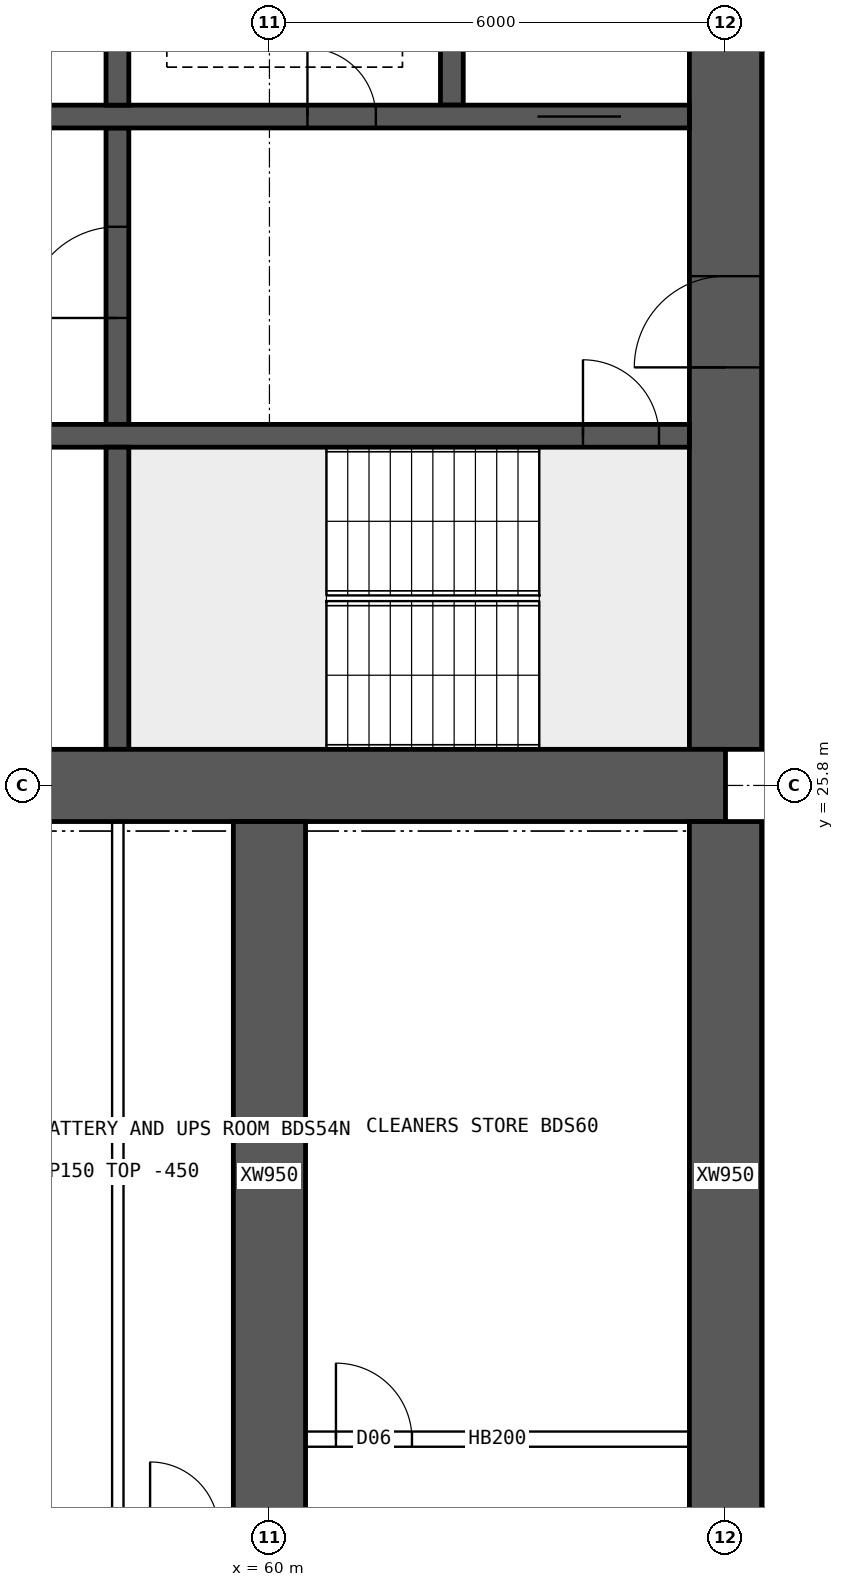
"""IFC4 building model, lengths in metres.
Left out: names, types, materials, properties, quantities, classifications, styles, units other than length and angle.
Written with IfcOpenShell. Run it as: python <this file> out.ifc"""

import sys

from ifc_helpers import new_model, si_unit, direction, frame, frame_2d, origin, place, context, subcontext, project, spatial, rectangle, extrude, element, fill, save


model = new_model("IFC4")
c1 = context("Model", 3, precision=1e-05, world=origin(), true_north=direction((0.0, 1.0)))
c2 = subcontext(c1, "Body", "Model", "MODEL_VIEW")
j1 = project(units=[si_unit("LENGTHUNIT", "METRE"), si_unit("PLANEANGLEUNIT", "RADIAN")], contexts=[c1])
p1 = place(None, origin())
s1 = spatial("IfcSite", under=j1, at=p1, CompositionType="ELEMENT")
p2 = place(p1, origin())
s2 = spatial("IfcBuilding", under=s1, at=p2, CompositionType="ELEMENT")
p3 = place(p2, frame((0.0, 0.0, 110.65)))
s3 = spatial("IfcBuildingStorey", under=s2, at=p3, CompositionType="ELEMENT", Elevation=110.65)
p4 = place(p3, frame((18.0, 25.8, 0.0), z_axis=(0.0, 0.0, 1.0), x_axis=(1.0, 0.0, 0.0)))
e1 = element("IfcWall", 1, at=p4, inside=s3, PredefinedType="SHEAR", context=c2, shape_type="SweptSolid", body=[
    extrude(rectangle(XDim=48.0, YDim=0.95, at=frame_2d((24.0, 0.0))), origin(), (0.0, 0.0, 1.0), 3.75),
])
p5 = place(p3, frame((66.0, 26.275, 0.0), z_axis=(0.0, 0.0, 1.0), x_axis=(0.0, 1.0, 0.0)))
e2 = element("IfcWall", 2, at=p5, inside=s3, PredefinedType="SHEAR", context=c2, shape_type="SweptSolid", body=[
    extrude(rectangle(XDim=11.45, YDim=0.95, at=frame_2d((5.725, 0.0))), origin(), (0.0, 0.0, 1.0), 3.75),
])
p6 = place(p5, frame((5.025, 0.0, 0.0)))
e3 = element("IfcOpeningElement", 3, at=p6, cuts=e2, PredefinedType="OPENING", context=c2, shape_type="SweptSolid", body=[
    extrude(rectangle(XDim=1.2, YDim=2.1, at=frame_2d((0.6, 1.05))), frame((0.0, 0.485, 0.0), z_axis=(0.0, -1.0, 0.0), x_axis=(1.0, 0.0, 0.0)), (0.0, 0.0, 1.0), 0.97),
])
p7 = place(p3, frame((18.475, 30.4, 0.0), z_axis=(0.0, 0.0, 1.0), x_axis=(1.0, 0.0, 0.0)))
e4 = element("IfcWall", 4, at=p7, inside=s3, PredefinedType="SHEAR", context=c2, shape_type="SweptSolid", body=[
    extrude(rectangle(XDim=47.05, YDim=0.3, at=frame_2d((23.525, 0.0))), origin(), (0.0, 0.0, 1.0), 3.75),
])
p8 = place(p7, frame((0.4, 0.0, 0.0)))
e5 = element("IfcOpeningElement", 5, at=p8, cuts=e4, PredefinedType="OPENING", context=c2, shape_type="SweptSolid", body=[
    extrude(rectangle(XDim=1.0, YDim=2.1, at=frame_2d((0.5, 1.05))), frame((0.0, 0.16, 0.0), z_axis=(0.0, -1.0, 0.0), x_axis=(1.0, 0.0, 0.0)), (0.0, 0.0, 1.0), 0.32),
])
p9 = place(p7, frame((45.65, 0.0, 0.0)))
e6 = element("IfcOpeningElement", 6, at=p9, cuts=e4, PredefinedType="OPENING", context=c2, shape_type="SweptSolid", body=[
    extrude(rectangle(XDim=1.0, YDim=2.1, at=frame_2d((0.5, 1.05))), frame((0.0, 0.16, 0.0), z_axis=(0.0, -1.0, 0.0), x_axis=(1.0, 0.0, 0.0)), (0.0, 0.0, 1.0), 0.32),
])
p10 = place(p7, frame((8.275, 0.0, 0.0)))
e7 = element("IfcOpeningElement", 7, at=p10, cuts=e4, PredefinedType="OPENING", context=c2, shape_type="SweptSolid", body=[
    extrude(rectangle(XDim=1.1, YDim=2.1, at=frame_2d((0.55, 1.05))), frame((0.0, 0.16, 0.0), z_axis=(0.0, -1.0, 0.0), x_axis=(1.0, 0.0, 0.0)), (0.0, 0.0, 1.0), 0.32),
])
p11 = place(p7, frame((10.875, 0.0, 0.0)))
e8 = element("IfcOpeningElement", 8, at=p11, cuts=e4, PredefinedType="OPENING", context=c2, shape_type="SweptSolid", body=[
    extrude(rectangle(XDim=1.1, YDim=2.1, at=frame_2d((0.55, 1.05))), frame((0.0, 0.16, 0.0), z_axis=(0.0, -1.0, 0.0), x_axis=(1.0, 0.0, 0.0)), (0.0, 0.0, 1.0), 0.32),
])
p12 = place(p7, frame((13.475, 0.0, 0.0)))
e9 = element("IfcOpeningElement", 9, at=p12, cuts=e4, PredefinedType="OPENING", context=c2, shape_type="SweptSolid", body=[
    extrude(rectangle(XDim=1.1, YDim=2.1, at=frame_2d((0.55, 1.05))), frame((0.0, 0.16, 0.0), z_axis=(0.0, -1.0, 0.0), x_axis=(1.0, 0.0, 0.0)), (0.0, 0.0, 1.0), 0.32),
])
p13 = place(p7, frame((16.075, 0.0, 0.0)))
e10 = element("IfcOpeningElement", 10, at=p13, cuts=e4, PredefinedType="OPENING", context=c2, shape_type="SweptSolid", body=[
    extrude(rectangle(XDim=1.1, YDim=2.1, at=frame_2d((0.55, 1.05))), frame((0.0, 0.16, 0.0), z_axis=(0.0, -1.0, 0.0), x_axis=(1.0, 0.0, 0.0)), (0.0, 0.0, 1.0), 0.32),
])
p14 = place(p7, frame((18.85, 0.0, 0.0)))
e11 = element("IfcOpeningElement", 11, at=p14, cuts=e4, PredefinedType="OPENING", context=c2, shape_type="SweptSolid", body=[
    extrude(rectangle(XDim=0.9, YDim=2.1, at=frame_2d((0.45, 1.05))), frame((0.0, 0.16, 0.0), z_axis=(0.0, -1.0, 0.0), x_axis=(1.0, 0.0, 0.0)), (0.0, 0.0, 1.0), 0.32),
])
p15 = place(p7, frame((30.142, 0.0, 0.0)))
e12 = element("IfcOpeningElement", 12, at=p15, cuts=e4, PredefinedType="OPENING", context=c2, shape_type="SweptSolid", body=[
    extrude(rectangle(XDim=1.1, YDim=2.1, at=frame_2d((0.55, 1.05))), frame((0.0, 0.16, 0.0), z_axis=(0.0, -1.0, 0.0), x_axis=(1.0, 0.0, 0.0)), (0.0, 0.0, 1.0), 0.32),
])
p16 = place(p7, frame((33.675, 0.0, 0.0)))
e13 = element("IfcOpeningElement", 13, at=p16, cuts=e4, PredefinedType="OPENING", context=c2, shape_type="SweptSolid", body=[
    extrude(rectangle(XDim=1.1, YDim=2.1, at=frame_2d((0.55, 1.05))), frame((0.0, 0.16, 0.0), z_axis=(0.0, -1.0, 0.0), x_axis=(1.0, 0.0, 0.0)), (0.0, 0.0, 1.0), 0.32),
])
p17 = place(p7, frame((37.208, 0.0, 0.0)))
e14 = element("IfcOpeningElement", 14, at=p17, cuts=e4, PredefinedType="OPENING", context=c2, shape_type="SweptSolid", body=[
    extrude(rectangle(XDim=1.1, YDim=2.1, at=frame_2d((0.55, 1.05))), frame((0.0, 0.16, 0.0), z_axis=(0.0, -1.0, 0.0), x_axis=(1.0, 0.0, 0.0)), (0.0, 0.0, 1.0), 0.32),
])
p18 = place(p3, frame((18.475, 34.6, 0.0), z_axis=(0.0, 0.0, 1.0), x_axis=(1.0, 0.0, 0.0)))
e15 = element("IfcWall", 15, at=p18, inside=s3, PredefinedType="SHEAR", context=c2, shape_type="SweptSolid", body=[
    extrude(rectangle(XDim=47.05, YDim=0.3, at=frame_2d((23.525, 0.0))), origin(), (0.0, 0.0, 1.0), 3.75),
])
p19 = place(p18, frame((0.9, 0.0, 0.0)))
e16 = element("IfcOpeningElement", 16, at=p19, cuts=e15, PredefinedType="OPENING", context=c2, shape_type="SweptSolid", body=[
    extrude(rectangle(XDim=1.1, YDim=2.1, at=frame_2d((0.55, 1.05))), frame((0.0, 0.16, 0.0), z_axis=(0.0, -1.0, 0.0), x_axis=(1.0, 0.0, 0.0)), (0.0, 0.0, 1.0), 0.32),
])
p20 = place(p18, frame((45.05, 0.0, 0.0)))
e17 = element("IfcOpeningElement", 17, at=p20, cuts=e15, PredefinedType="OPENING", context=c2, shape_type="SweptSolid", body=[
    extrude(rectangle(XDim=1.1, YDim=2.1, at=frame_2d((0.55, 1.05))), frame((0.0, 0.16, 0.0), z_axis=(0.0, -1.0, 0.0), x_axis=(1.0, 0.0, 0.0)), (0.0, 0.0, 1.0), 0.32),
])
p21 = place(p18, frame((4.125, 0.0, 0.0)))
e18 = element("IfcOpeningElement", 18, at=p21, cuts=e15, PredefinedType="OPENING", context=c2, shape_type="SweptSolid", body=[
    extrude(rectangle(XDim=0.9, YDim=2.1, at=frame_2d((0.45, 1.05))), frame((0.0, 0.16, 0.0), z_axis=(0.0, -1.0, 0.0), x_axis=(1.0, 0.0, 0.0)), (0.0, 0.0, 1.0), 0.32),
])
p22 = place(p18, frame((42.025, 0.0, 0.0)))
e19 = element("IfcOpeningElement", 19, at=p22, cuts=e15, PredefinedType="OPENING", context=c2, shape_type="SweptSolid", body=[
    extrude(rectangle(XDim=0.9, YDim=2.1, at=frame_2d((0.45, 1.05))), frame((0.0, 0.16, 0.0), z_axis=(0.0, -1.0, 0.0), x_axis=(1.0, 0.0, 0.0)), (0.0, 0.0, 1.0), 0.32),
])
p23 = place(p18, frame((8.9, 0.0, 0.0)))
e20 = element("IfcOpeningElement", 20, at=p23, cuts=e15, PredefinedType="OPENING", context=c2, shape_type="SweptSolid", body=[
    extrude(rectangle(XDim=0.9, YDim=2.1, at=frame_2d((0.45, 1.05))), frame((0.0, 0.16, 0.0), z_axis=(0.0, -1.0, 0.0), x_axis=(1.0, 0.0, 0.0)), (0.0, 0.0, 1.0), 0.32),
])
p24 = place(p18, frame((12.874, 0.0, 0.0)))
e21 = element("IfcOpeningElement", 21, at=p24, cuts=e15, PredefinedType="OPENING", context=c2, shape_type="SweptSolid", body=[
    extrude(rectangle(XDim=0.9, YDim=2.1, at=frame_2d((0.45, 1.05))), frame((0.0, 0.16, 0.0), z_axis=(0.0, -1.0, 0.0), x_axis=(1.0, 0.0, 0.0)), (0.0, 0.0, 1.0), 0.32),
])
p25 = place(p18, frame((16.521, 0.0, 0.0)))
e22 = element("IfcOpeningElement", 22, at=p25, cuts=e15, PredefinedType="OPENING", context=c2, shape_type="SweptSolid", body=[
    extrude(rectangle(XDim=0.9, YDim=2.1, at=frame_2d((0.45, 1.05))), frame((0.0, 0.16, 0.0), z_axis=(0.0, -1.0, 0.0), x_axis=(1.0, 0.0, 0.0)), (0.0, 0.0, 1.0), 0.32),
])
p26 = place(p18, frame((20.28, 0.0, 0.0)))
e23 = element("IfcOpeningElement", 23, at=p26, cuts=e15, PredefinedType="OPENING", context=c2, shape_type="SweptSolid", body=[
    extrude(rectangle(XDim=0.9, YDim=2.1, at=frame_2d((0.45, 1.05))), frame((0.0, 0.16, 0.0), z_axis=(0.0, -1.0, 0.0), x_axis=(1.0, 0.0, 0.0)), (0.0, 0.0, 1.0), 0.32),
])
p27 = place(p18, frame((24.686, 0.0, 0.0)))
e24 = element("IfcOpeningElement", 24, at=p27, cuts=e15, PredefinedType="OPENING", context=c2, shape_type="SweptSolid", body=[
    extrude(rectangle(XDim=0.9, YDim=2.1, at=frame_2d((0.45, 1.05))), frame((0.0, 0.16, 0.0), z_axis=(0.0, -1.0, 0.0), x_axis=(1.0, 0.0, 0.0)), (0.0, 0.0, 1.0), 0.32),
])
p28 = place(p18, frame((27.483, 0.0, 0.0)))
e25 = element("IfcOpeningElement", 25, at=p28, cuts=e15, PredefinedType="OPENING", context=c2, shape_type="SweptSolid", body=[
    extrude(rectangle(XDim=0.9, YDim=2.1, at=frame_2d((0.45, 1.05))), frame((0.0, 0.16, 0.0), z_axis=(0.0, -1.0, 0.0), x_axis=(1.0, 0.0, 0.0)), (0.0, 0.0, 1.0), 0.32),
])
p29 = place(p18, frame((29.856, 0.0, 0.0)))
e26 = element("IfcOpeningElement", 26, at=p29, cuts=e15, PredefinedType="OPENING", context=c2, shape_type="SweptSolid", body=[
    extrude(rectangle(XDim=0.9, YDim=2.1, at=frame_2d((0.45, 1.05))), frame((0.0, 0.16, 0.0), z_axis=(0.0, -1.0, 0.0), x_axis=(1.0, 0.0, 0.0)), (0.0, 0.0, 1.0), 0.32),
])
p30 = place(p18, frame((35.326, 0.0, 0.0)))
e27 = element("IfcOpeningElement", 27, at=p30, cuts=e15, PredefinedType="OPENING", context=c2, shape_type="SweptSolid", body=[
    extrude(rectangle(XDim=0.9, YDim=2.1, at=frame_2d((0.45, 1.05))), frame((0.0, 0.16, 0.0), z_axis=(0.0, -1.0, 0.0), x_axis=(1.0, 0.0, 0.0)), (0.0, 0.0, 1.0), 0.32),
])
p31 = place(p3, frame((58.0, 26.275, 0.0), z_axis=(0.0, 0.0, 1.0), x_axis=(0.0, 1.0, 0.0)))
e28 = element("IfcWall", 28, at=p31, inside=s3, PredefinedType="SHEAR", context=c2, shape_type="SweptSolid", body=[
    extrude(rectangle(XDim=3.975, YDim=0.3, at=frame_2d((1.988, 0.0))), origin(), (0.0, 0.0, 1.0), 3.75),
])
p32 = place(p3, frame((58.0, 30.55, 0.0), z_axis=(0.0, 0.0, 1.0), x_axis=(0.0, 1.0, 0.0)))
e29 = element("IfcWall", 29, at=p32, inside=s3, PredefinedType="SHEAR", context=c2, shape_type="SweptSolid", body=[
    extrude(rectangle(XDim=3.9, YDim=0.3, at=frame_2d((1.95, 0.0))), origin(), (0.0, 0.0, 1.0), 3.75),
])
p33 = place(p32, frame((1.4, 0.0, 0.0)))
e30 = element("IfcOpeningElement", 30, at=p33, cuts=e29, PredefinedType="OPENING", context=c2, shape_type="SweptSolid", body=[
    extrude(rectangle(XDim=1.2, YDim=2.1, at=frame_2d((0.6, 1.05))), frame((0.0, 0.16, 0.0), z_axis=(0.0, -1.0, 0.0), x_axis=(1.0, 0.0, 0.0)), (0.0, 0.0, 1.0), 0.32),
])
for number, where, z_axis, x_axis in (
    (31, (62.4, 34.75, 0.0), (0.0, 0.0, 1.0), (0.0, 1.0, 0.0)),
    (32, (58.0, 34.75, 0.0), (0.0, 0.0, 1.0), (0.0, 1.0, 0.0)),
):
    element("IfcWall", number, at=place(p3, frame(where, z_axis=z_axis, x_axis=x_axis)), inside=s3, PredefinedType="SHEAR", context=c2, shape_type="SweptSolid", body=[
        extrude(rectangle(XDim=2.975, YDim=0.3, at=frame_2d((1.488, 0.0))), origin(), (0.0, 0.0, 1.0), 3.75),
    ])
for number, where, z_axis, x_axis in (
    (33, (60.0, 16.0, 0.0), (0.0, 0.0, 1.0), (0.0, 1.0, 0.0)),
    (34, (66.0, 16.0, 0.0), (0.0, 0.0, 1.0), (0.0, 1.0, 0.0)),
):
    element("IfcWall", number, at=place(p3, frame(where, z_axis=z_axis, x_axis=x_axis)), inside=s3, PredefinedType="SHEAR", context=c2, shape_type="SweptSolid", body=[
        extrude(rectangle(XDim=9.325, YDim=0.95, at=frame_2d((4.663, 0.0))), origin(), (0.0, 0.0, 1.0), 3.75),
    ])
p34 = place(p3, frame((58.005, 16.1, 0.0), z_axis=(0.0, 0.0, 1.0), x_axis=(0.0, 1.0, 0.0)))
e35 = element("IfcWall", 35, at=p34, inside=s3, PredefinedType="PARTITIONING", context=c2, shape_type="SweptSolid", body=[
    extrude(rectangle(XDim=9.225, YDim=0.15, at=frame_2d((4.612, 0.0))), origin(), (0.0, 0.0, 1.0), 3.3),
])
p35 = place(p3, frame((60.475, 17.2, 0.0), z_axis=(0.0, 0.0, 1.0), x_axis=(1.0, 0.0, 0.0)))
e36 = element("IfcWall", 36, at=p35, inside=s3, PredefinedType="SOLIDWALL", context=c2, shape_type="SweptSolid", body=[
    extrude(rectangle(XDim=5.05, YDim=0.2, at=frame_2d((2.525, 0.0))), origin(), (0.0, 0.0, 1.0), 3.3),
])
p36 = place(p35, frame((0.4, 0.0, 0.0)))
e37 = element("IfcOpeningElement", 37, at=p36, cuts=e36, PredefinedType="OPENING", context=c2, shape_type="SweptSolid", body=[
    extrude(rectangle(XDim=1.0, YDim=2.1, at=frame_2d((0.5, 1.05))), frame((0.0, 0.11, 0.0), z_axis=(0.0, -1.0, 0.0), x_axis=(1.0, 0.0, 0.0)), (0.0, 0.0, 1.0), 0.22),
])
p37 = place(p6, origin())
e38 = element("IfcDoor", 38, at=p37, inside=s3, OperationType="SINGLE_SWING_LEFT", PredefinedType="DOOR", context=c2, shape_type="SweptSolid", body=[
    extrude(rectangle(XDim=1.2, YDim=2.1, at=frame_2d((0.6, 1.05))), frame((0.0, 0.025, 0.0), z_axis=(0.0, -1.0, 0.0), x_axis=(1.0, 0.0, 0.0)), (0.0, 0.0, 1.0), 0.05),
])
fill(e3, e38)
p38 = place(p9, origin())
e39 = element("IfcDoor", 39, at=p38, inside=s3, OperationType="SINGLE_SWING_LEFT", PredefinedType="DOOR", context=c2, shape_type="SweptSolid", body=[
    extrude(rectangle(XDim=1.0, YDim=2.1, at=frame_2d((0.5, 1.05))), frame((0.0, 0.025, 0.0), z_axis=(0.0, -1.0, 0.0), x_axis=(1.0, 0.0, 0.0)), (0.0, 0.0, 1.0), 0.05),
])
fill(e6, e39)
p39 = place(p20, origin())
e40 = element("IfcDoor", 40, at=p39, inside=s3, OperationType="DOUBLE_DOOR_SLIDING", PredefinedType="DOOR", context=c2, shape_type="SweptSolid", body=[
    extrude(rectangle(XDim=1.1, YDim=2.1, at=frame_2d((0.55, 1.05))), frame((0.0, 0.025, 0.0), z_axis=(0.0, -1.0, 0.0), x_axis=(1.0, 0.0, 0.0)), (0.0, 0.0, 1.0), 0.05),
])
fill(e17, e40)
p40 = place(p22, origin())
e41 = element("IfcDoor", 41, at=p40, inside=s3, OperationType="SINGLE_SWING_LEFT", PredefinedType="DOOR", context=c2, shape_type="SweptSolid", body=[
    extrude(rectangle(XDim=0.9, YDim=2.1, at=frame_2d((0.45, 1.05))), frame((0.0, 0.025, 0.0), z_axis=(0.0, -1.0, 0.0), x_axis=(1.0, 0.0, 0.0)), (0.0, 0.0, 1.0), 0.05),
])
fill(e19, e41)
p41 = place(p33, origin())
e42 = element("IfcDoor", 42, at=p41, inside=s3, OperationType="SINGLE_SWING_LEFT", PredefinedType="DOOR", context=c2, shape_type="SweptSolid", body=[
    extrude(rectangle(XDim=1.2, YDim=2.1, at=frame_2d((0.6, 1.05))), frame((0.0, 0.025, 0.0), z_axis=(0.0, -1.0, 0.0), x_axis=(1.0, 0.0, 0.0)), (0.0, 0.0, 1.0), 0.05),
])
fill(e30, e42)
p42 = place(p36, origin())
e43 = element("IfcDoor", 43, at=p42, inside=s3, OperationType="SINGLE_SWING_LEFT", PredefinedType="DOOR", context=c2, shape_type="SweptSolid", body=[
    extrude(rectangle(XDim=1.0, YDim=2.1, at=frame_2d((0.5, 1.05))), frame((0.0, 0.025, 0.0), z_axis=(0.0, -1.0, 0.0), x_axis=(1.0, 0.0, 0.0)), (0.0, 0.0, 1.0), 0.05),
])
fill(e37, e43)
save(model, sys.argv[1])
